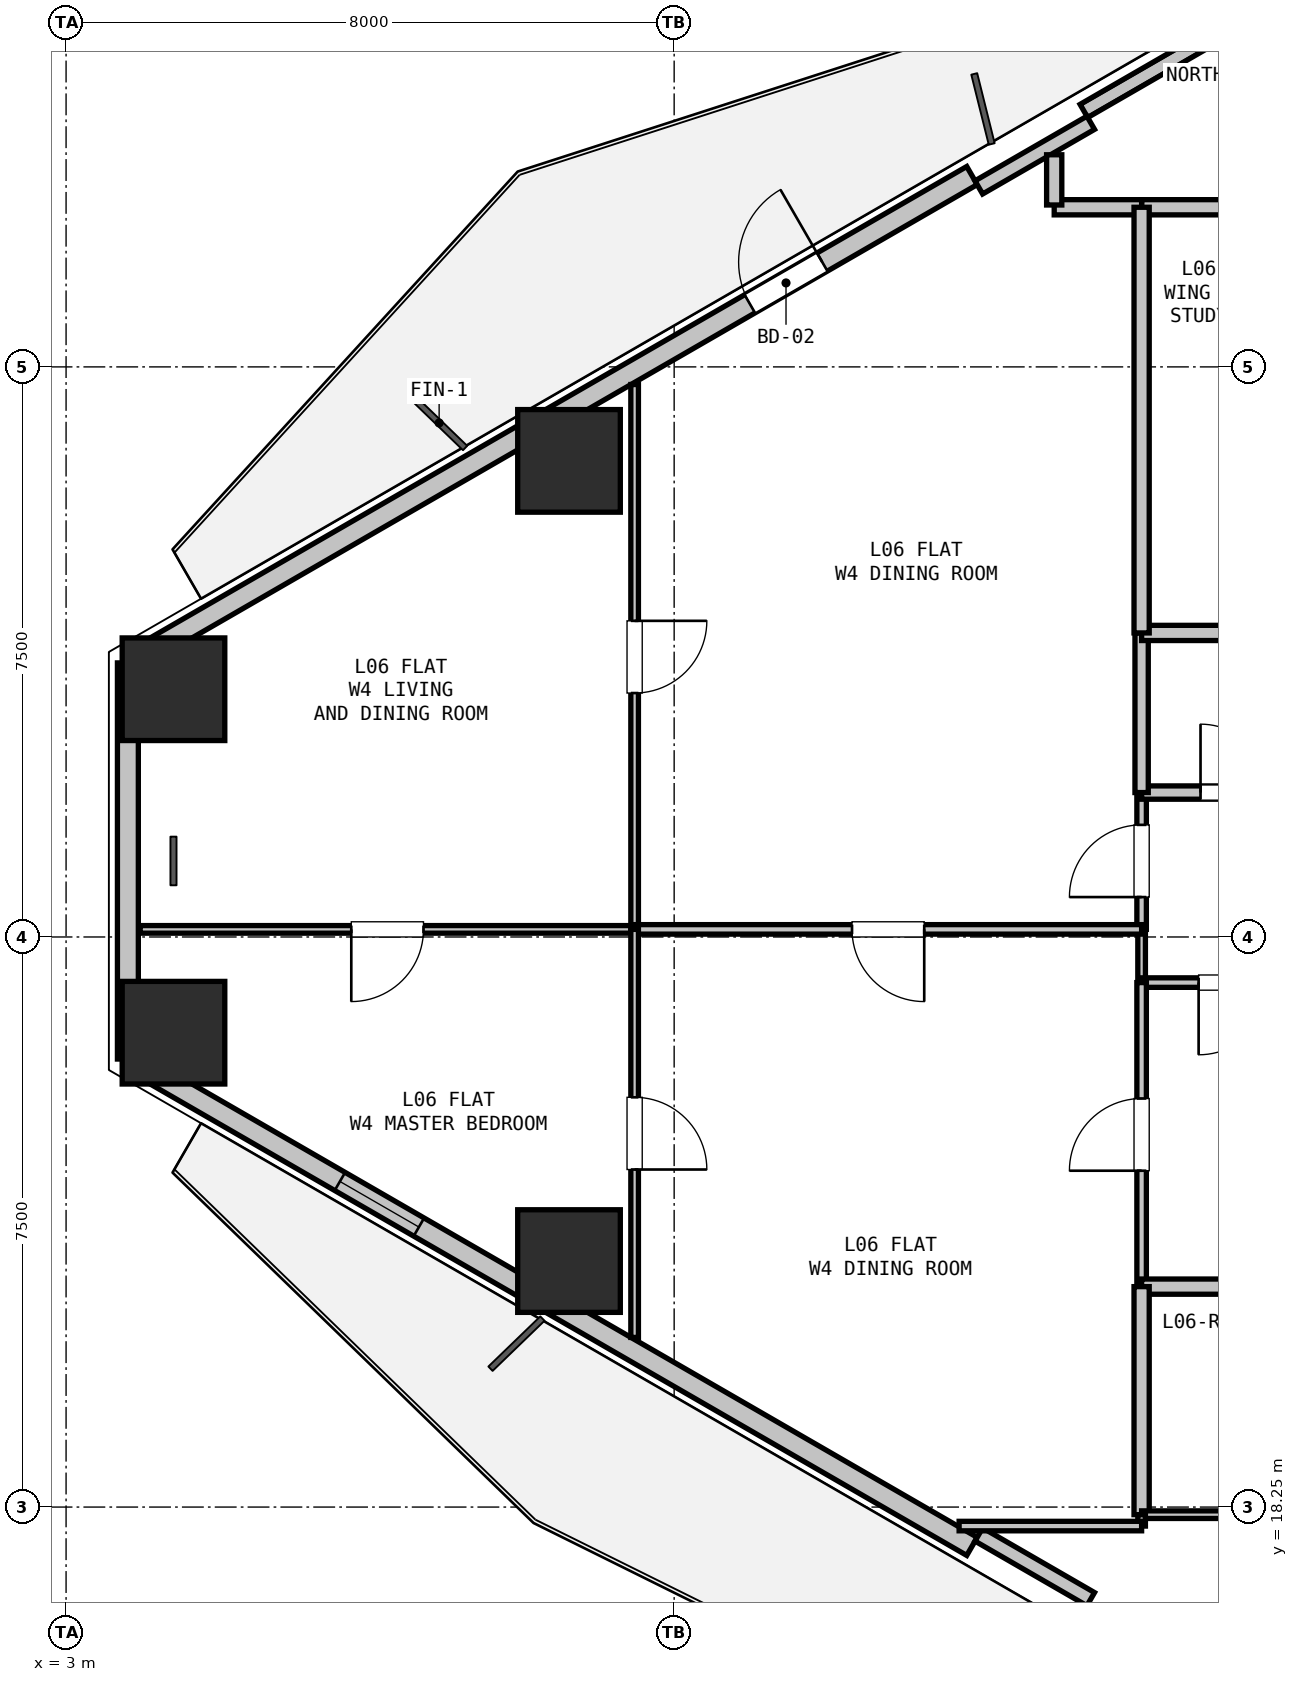
"""IFC4 building model, lengths in metres.
Left out: names, types, materials, properties, quantities, classifications, styles, units other than length and angle.
Written with IfcOpenShell. Run it as: python <this file> out.ifc"""

import sys

from ifc_helpers import new_model, si_unit, direction, frame, frame_2d, origin, origin_2d, place, context, subcontext, project, spatial, rectangle, hollow_rectangle, extrude, element, fill, save


model = new_model("IFC4")
c1 = context("Model", 3, precision=1e-05, world=origin(), true_north=direction((0.0, 1.0)))
c2 = subcontext(c1, "Body", "Model", "MODEL_VIEW")
j1 = project(units=[si_unit("LENGTHUNIT", "METRE"), si_unit("PLANEANGLEUNIT", "RADIAN")], contexts=[c1])
p1 = place(None, origin())
s1 = spatial("IfcSite", under=j1, at=p1, CompositionType="ELEMENT")
p2 = place(p1, origin())
s2 = spatial("IfcBuilding", under=s1, at=p2, CompositionType="ELEMENT")
p3 = place(p2, frame((0.0, 0.0, 25.8)))
s3 = spatial("IfcBuildingStorey", under=s2, at=p3, CompositionType="ELEMENT", Elevation=25.8)
for number, where, z_axis, x_axis in (
    (1, (4.413, 29.009, 0.0), (0.0, 0.0, 1.0), (1.0, 0.0, 0.0)),
    (2, (9.617, 32.014, 0.0), (0.0, 0.0, 1.0), (1.0, 0.0, 0.0)),
    (3, (9.617, 21.486, 0.0), (0.0, 0.0, 1.0), (1.0, 0.0, 0.0)),
    (4, (4.413, 24.491, 0.0), (0.0, 0.0, 1.0), (1.0, 0.0, 0.0)),
):
    element("IfcColumn", number, at=place(p3, frame(where, z_axis=z_axis, x_axis=x_axis)), inside=s3, PredefinedType="COLUMN", context=c2, shape_type="SweptSolid", body=[
        extrude(hollow_rectangle(XDim=1.35, YDim=1.35, WallThickness=0.036, at=origin_2d()), origin(), (0.0, 0.0, 1.0), 3.3),
    ])
p4 = place(p3, frame((3.813, 24.144, 0.0), z_axis=(0.0, 0.0, 1.0), x_axis=(0.0, 1.0, 0.0)))
e5 = element("IfcWall", 5, at=p4, inside=s3, PredefinedType="SOLIDWALL", context=c2, shape_type="SweptSolid", body=[
    extrude(rectangle(XDim=5.211, YDim=0.275, at=frame_2d((2.606, 0.0))), origin(), (0.0, 0.0, 1.0), 2.66),
])
p5 = place(p3, frame((3.943, 29.431, 0.0), z_axis=(0.0, 0.0, 1.0), x_axis=(0.866027105532, 0.499997052475, 0.0)))
e6 = element("IfcWall", 6, at=p5, inside=s3, PredefinedType="SOLIDWALL", context=c2, shape_type="SweptSolid", body=[
    extrude(rectangle(XDim=12.673, YDim=0.275, at=frame_2d((6.336, 0.0))), origin(), (0.0, 0.0, 1.0), 2.66),
])
p6 = place(p5, frame((9.298, 0.0, 0.0)))
e7 = element("IfcOpeningElement", 7, at=p6, cuts=e6, PredefinedType="OPENING", context=c2, shape_type="SweptSolid", body=[
    extrude(rectangle(XDim=1.1, YDim=2.1, at=frame_2d((0.55, 1.05))), frame((0.0, 0.147, 0.0), z_axis=(0.0, -1.0, 0.0), x_axis=(1.0, 0.0, 0.0)), (0.0, 0.0, 1.0), 0.295),
])
p7 = place(p3, frame((16.39, 36.617, 0.0), z_axis=(0.0, 0.0, 1.0), x_axis=(0.866027351828, 0.499996625875, 0.0)))
e8 = element("IfcWall", 8, at=p7, inside=s3, PredefinedType="PARAPET", context=c2, shape_type="SweptSolid", body=[
    extrude(rectangle(XDim=11.973, YDim=0.2, at=frame_2d((5.987, 0.0))), origin(), (0.0, 0.0, 1.0), 0.2),
])
p8 = place(p3, frame((15.008, 35.611, 0.0), z_axis=(0.0, 0.0, 1.0), x_axis=(0.86605165483, 0.499954529098, 0.0)))
e9 = element("IfcWall", 9, at=p8, inside=s3, PredefinedType="PARAPET", context=c2, shape_type="SweptSolid", body=[
    extrude(rectangle(XDim=1.7, YDim=0.2, at=frame_2d((0.85, 0.0))), origin(), (0.0, 0.0, 1.0), 2.66),
])
p9 = place(p3, frame((14.918, 17.733, 0.0), z_axis=(0.0, 0.0, 1.0), x_axis=(-0.866027105532, 0.499997052475, 0.0)))
e10 = element("IfcWall", 10, at=p9, inside=s3, PredefinedType="SOLIDWALL", context=c2, shape_type="SweptSolid", body=[
    extrude(rectangle(XDim=12.673, YDim=0.275, at=frame_2d((6.336, 0.0))), origin(), (0.0, 0.0, 1.0), 2.66),
])
p10 = place(p9, frame((8.402, 0.0, 0.9)))
e11 = element("IfcOpeningElement", 11, at=p10, cuts=e10, PredefinedType="OPENING", context=c2, shape_type="SweptSolid", body=[
    extrude(rectangle(XDim=1.2, YDim=1.4, at=frame_2d((0.6, 0.7))), frame((0.0, 0.147, 0.0), z_axis=(0.0, -1.0, 0.0), x_axis=(1.0, 0.0, 0.0)), (0.0, 0.0, 1.0), 0.295),
])
p11 = place(p3, frame((16.48, 17.039, 0.0), z_axis=(0.0, 0.0, 1.0), x_axis=(-0.86605165483, 0.499954529098, 0.0)))
e12 = element("IfcWall", 12, at=p11, inside=s3, PredefinedType="PARAPET", context=c2, shape_type="SweptSolid", body=[
    extrude(rectangle(XDim=1.7, YDim=0.2, at=frame_2d((0.85, 0.0))), origin(), (0.0, 0.0, 1.0), 2.66),
])
p12 = place(p3, frame((17.15, 25.15, 0.0), z_axis=(0.0, 0.0, 1.0), x_axis=(0.0, 1.0, 0.0)))
e13 = element("IfcWall", 13, at=p12, inside=s3, PredefinedType="PARTITIONING", context=c2, shape_type="SweptSolid", body=[
    extrude(rectangle(XDim=0.7, YDim=0.1, at=frame_2d((0.35, 0.0))), origin(), (0.0, 0.0, 1.0), 3.04),
])
p13 = place(p3, frame((17.15, 25.85, 0.0), z_axis=(0.0, 0.0, 1.0), x_axis=(0.0, 1.0, 0.0)))
e14 = element("IfcWall", 14, at=p13, inside=s3, PredefinedType="PARTITIONING", context=c2, shape_type="SweptSolid", body=[
    extrude(rectangle(XDim=1.8, YDim=0.125, at=frame_2d((0.9, 0.0))), origin(), (0.0, 0.0, 1.0), 3.04),
])
p14 = place(p13, frame((0.425, 0.0, 0.0)))
e15 = element("IfcOpeningElement", 15, at=p14, cuts=e14, PredefinedType="OPENING", context=c2, shape_type="SweptSolid", body=[
    extrude(rectangle(XDim=0.95, YDim=2.1, at=frame_2d((0.475, 1.05))), frame((0.0, 0.073, 0.0), z_axis=(0.0, -1.0, 0.0), x_axis=(1.0, 0.0, 0.0)), (0.0, 0.0, 1.0), 0.145),
])
p15 = place(p3, frame((17.15, 27.65, 0.0), z_axis=(0.0, 0.0, 1.0), x_axis=(1.0, 0.0, 0.0)))
e16 = element("IfcWall", 16, at=p15, inside=s3, PredefinedType="PLUMBINGWALL", context=c2, shape_type="SweptSolid", body=[
    extrude(rectangle(XDim=2.45, YDim=0.175, at=frame_2d((1.225, 0.0))), origin(), (0.0, 0.0, 1.0), 3.04),
])
p16 = place(p15, frame((0.775, 0.0, 0.0)))
e17 = element("IfcOpeningElement", 17, at=p16, cuts=e16, PredefinedType="OPENING", context=c2, shape_type="SweptSolid", body=[
    extrude(rectangle(XDim=0.9, YDim=2.1, at=frame_2d((0.45, 1.05))), frame((0.0, 0.097, 0.0), z_axis=(0.0, -1.0, 0.0), x_axis=(1.0, 0.0, 0.0)), (0.0, 0.0, 1.0), 0.195),
])
p17 = place(p3, frame((19.6, 25.15, 0.0), z_axis=(0.0, 0.0, 1.0), x_axis=(-1.0, 0.0, 0.0)))
e18 = element("IfcWall", 18, at=p17, inside=s3, PredefinedType="PARTITIONING", context=c2, shape_type="SweptSolid", body=[
    extrude(rectangle(XDim=2.45, YDim=0.125, at=frame_2d((1.225, 0.0))), origin(), (0.0, 0.0, 1.0), 3.04),
])
p18 = place(p17, frame((0.75, 0.0, 0.0)))
e19 = element("IfcOpeningElement", 19, at=p18, cuts=e18, PredefinedType="OPENING", context=c2, shape_type="SweptSolid", body=[
    extrude(rectangle(XDim=0.95, YDim=2.1, at=frame_2d((0.475, 1.05))), frame((0.0, 0.073, 0.0), z_axis=(0.0, -1.0, 0.0), x_axis=(1.0, 0.0, 0.0)), (0.0, 0.0, 1.0), 0.145),
])
p19 = place(p3, frame((17.15, 27.65, 0.0), z_axis=(0.0, 0.0, 1.0), x_axis=(0.0, 1.0, 0.0)))
e20 = element("IfcWall", 20, at=p19, inside=s3, PredefinedType="PLUMBINGWALL", context=c2, shape_type="SweptSolid", body=[
    extrude(rectangle(XDim=2.1, YDim=0.175, at=frame_2d((1.05, 0.0))), origin(), (0.0, 0.0, 1.0), 3.04),
])
p20 = place(p3, frame((17.15, 29.75, 0.0), z_axis=(0.0, 0.0, 1.0), x_axis=(1.0, 0.0, 0.0)))
e21 = element("IfcWall", 21, at=p20, inside=s3, PredefinedType="PARTITIONING", context=c2, shape_type="SweptSolid", body=[
    extrude(rectangle(XDim=2.45, YDim=0.2, at=frame_2d((1.225, 0.0))), origin(), (0.0, 0.0, 1.0), 3.04),
])
p21 = place(p3, frame((17.15, 21.15, 0.0), z_axis=(0.0, 0.0, 1.0), x_axis=(0.0, 1.0, 0.0)))
e22 = element("IfcWall", 22, at=p21, inside=s3, PredefinedType="PARTITIONING", context=c2, shape_type="SweptSolid", body=[
    extrude(rectangle(XDim=4.0, YDim=0.125, at=frame_2d((2.0, 0.0))), origin(), (0.0, 0.0, 1.0), 2.337),
])
p22 = place(p21, frame((1.525, 0.0, 0.0)))
e23 = element("IfcOpeningElement", 23, at=p22, cuts=e22, PredefinedType="OPENING", context=c2, shape_type="SweptSolid", body=[
    extrude(rectangle(XDim=0.95, YDim=2.1, at=frame_2d((0.475, 1.05))), frame((0.0, 0.073, 0.0), z_axis=(0.0, -1.0, 0.0), x_axis=(1.0, 0.0, 0.0)), (0.0, 0.0, 1.0), 0.145),
])
p23 = place(p3, frame((19.6, 21.15, 0.0), z_axis=(0.0, 0.0, 1.0), x_axis=(-1.0, 0.0, 0.0)))
e24 = element("IfcWall", 24, at=p23, inside=s3, PredefinedType="PARTITIONING", context=c2, shape_type="SweptSolid", body=[
    extrude(rectangle(XDim=2.45, YDim=0.2, at=frame_2d((1.225, 0.0))), origin(), (0.0, 0.0, 1.0), 2.337),
])
p24 = place(p3, frame((19.6, 35.35, 0.0), z_axis=(0.0, 0.0, 1.0), x_axis=(-1.0, 0.0, 0.0)))
e25 = element("IfcWall", 25, at=p24, inside=s3, PredefinedType="PARTITIONING", context=c2, shape_type="SweptSolid", body=[
    extrude(rectangle(XDim=2.45, YDim=0.2, at=frame_2d((1.225, 0.0))), origin(), (0.0, 0.0, 1.0), 3.04),
])
p25 = place(p3, frame((17.15, 35.35, 0.0), z_axis=(0.0, 0.0, 1.0), x_axis=(-1.0, 0.0, 0.0)))
e26 = element("IfcWall", 26, at=p25, inside=s3, PredefinedType="PARTITIONING", context=c2, shape_type="SweptSolid", body=[
    extrude(rectangle(XDim=1.15, YDim=0.2, at=frame_2d((0.575, 0.0))), origin(), (0.0, 0.0, 1.0), 3.04),
])
p26 = place(p3, frame((16.0, 35.38, 0.0), z_axis=(0.0, 0.0, 1.0), x_axis=(0.0, 1.0, 0.0)))
e27 = element("IfcWall", 27, at=p26, inside=s3, PredefinedType="PARTITIONING", context=c2, shape_type="SweptSolid", body=[
    extrude(rectangle(XDim=0.661, YDim=0.2, at=frame_2d((0.331, 0.0))), origin(), (0.0, 0.0, 1.0), 2.365),
])
p27 = place(p3, frame((17.15, 29.75, 0.0), z_axis=(0.0, 0.0, 1.0), x_axis=(0.0, 1.0, 0.0)))
e28 = element("IfcWall", 28, at=p27, inside=s3, PredefinedType="PARTITIONING", context=c2, shape_type="SweptSolid", body=[
    extrude(rectangle(XDim=5.6, YDim=0.2, at=frame_2d((2.8, 0.0))), origin(), (0.0, 0.0, 1.0), 2.337),
])
p28 = place(p3, frame((17.15, 18.15, 0.0), z_axis=(0.0, 0.0, 1.0), x_axis=(0.0, 1.0, 0.0)))
e29 = element("IfcWall", 29, at=p28, inside=s3, PredefinedType="PARTITIONING", context=c2, shape_type="SweptSolid", body=[
    extrude(rectangle(XDim=3.0, YDim=0.2, at=frame_2d((1.5, 0.0))), origin(), (0.0, 0.0, 1.0), 3.04),
])
p29 = place(p3, frame((19.6, 18.15, 0.0), z_axis=(0.0, 0.0, 1.0), x_axis=(-1.0, 0.0, 0.0)))
e30 = element("IfcWall", 30, at=p29, inside=s3, PredefinedType="PARTITIONING", context=c2, shape_type="SweptSolid", body=[
    extrude(rectangle(XDim=2.45, YDim=0.1, at=frame_2d((1.225, 0.0))), origin(), (0.0, 0.0, 1.0), 3.04),
])
p30 = place(p3, frame((10.48, 25.85, 0.0), z_axis=(0.0, 0.0, 1.0), x_axis=(-1.0, 0.0, 0.0)))
e31 = element("IfcWall", 31, at=p30, inside=s3, PredefinedType="PARTITIONING", context=c2, shape_type="SweptSolid", body=[
    extrude(rectangle(XDim=6.505, YDim=0.1, at=frame_2d((3.253, 0.0))), origin(), (0.0, 0.0, 1.0), 2.65),
])
p31 = place(p30, frame((2.778, 0.0, 0.0)))
e32 = element("IfcOpeningElement", 32, at=p31, cuts=e31, PredefinedType="OPENING", context=c2, shape_type="SweptSolid", body=[
    extrude(rectangle(XDim=0.95, YDim=2.1, at=frame_2d((0.475, 1.05))), frame((0.0, 0.06, 0.0), z_axis=(0.0, -1.0, 0.0), x_axis=(1.0, 0.0, 0.0)), (0.0, 0.0, 1.0), 0.12),
])
p32 = place(p3, frame((3.813, 29.356, 0.0), z_axis=(0.0, 0.0, 1.0), x_axis=(0.866131372301, 0.499816412211, 0.0)))
e33 = element("IfcWall", 33, at=p32, inside=s3, PredefinedType="PARTITIONING", context=c2, shape_type="SweptSolid", body=[
    extrude(rectangle(XDim=0.15, YDim=0.125, at=frame_2d((0.075, 0.0))), origin(), (0.0, 0.0, 1.0), 3.04),
])
p33 = place(p3, frame((10.48, 33.018, 0.0), z_axis=(0.0, 0.0, 1.0), x_axis=(0.0, -1.0, 0.0)))
e34 = element("IfcWall", 34, at=p33, inside=s3, PredefinedType="PARTITIONING", context=c2, shape_type="SweptSolid", body=[
    extrude(rectangle(XDim=7.168, YDim=0.1, at=frame_2d((3.584, 0.0))), origin(), (0.0, 0.0, 1.0), 2.337),
])
p34 = place(p33, frame((3.109, 0.0, 0.0)))
e35 = element("IfcOpeningElement", 35, at=p34, cuts=e34, PredefinedType="OPENING", context=c2, shape_type="SweptSolid", body=[
    extrude(rectangle(XDim=0.95, YDim=2.1, at=frame_2d((0.475, 1.05))), frame((0.0, 0.06, 0.0), z_axis=(0.0, -1.0, 0.0), x_axis=(1.0, 0.0, 0.0)), (0.0, 0.0, 1.0), 0.12),
])
p35 = place(p3, frame((17.15, 25.85, 0.0), z_axis=(0.0, 0.0, 1.0), x_axis=(-1.0, 0.0, 0.0)))
e36 = element("IfcWall", 36, at=p35, inside=s3, PredefinedType="PARTITIONING", context=c2, shape_type="SweptSolid", body=[
    extrude(rectangle(XDim=6.67, YDim=0.125, at=frame_2d((3.335, 0.0))), origin(), (0.0, 0.0, 1.0), 3.04),
])
p36 = place(p35, frame((2.86, 0.0, 0.0)))
e37 = element("IfcOpeningElement", 37, at=p36, cuts=e36, PredefinedType="OPENING", context=c2, shape_type="SweptSolid", body=[
    extrude(rectangle(XDim=0.95, YDim=2.1, at=frame_2d((0.475, 1.05))), frame((0.0, 0.073, 0.0), z_axis=(0.0, -1.0, 0.0), x_axis=(1.0, 0.0, 0.0)), (0.0, 0.0, 1.0), 0.145),
])
p37 = place(p3, frame((10.48, 25.85, 0.0), z_axis=(0.0, 0.0, 1.0), x_axis=(0.0, -1.0, 0.0)))
e38 = element("IfcWall", 38, at=p37, inside=s3, PredefinedType="PARTITIONING", context=c2, shape_type="SweptSolid", body=[
    extrude(rectangle(XDim=5.368, YDim=0.1, at=frame_2d((2.684, 0.0))), origin(), (0.0, 0.0, 1.0), 2.337),
])
p38 = place(p37, frame((2.209, 0.0, 0.0)))
e39 = element("IfcOpeningElement", 39, at=p38, cuts=e38, PredefinedType="OPENING", context=c2, shape_type="SweptSolid", body=[
    extrude(rectangle(XDim=0.95, YDim=2.1, at=frame_2d((0.475, 1.05))), frame((0.0, 0.06, 0.0), z_axis=(0.0, -1.0, 0.0), x_axis=(1.0, 0.0, 0.0)), (0.0, 0.0, 1.0), 0.12),
])
p39 = place(p3, frame((3.943, 24.069, 0.0), z_axis=(0.0, 0.0, 1.0), x_axis=(-0.866131372301, 0.499816412211, 0.0)))
e40 = element("IfcWall", 40, at=p39, inside=s3, PredefinedType="PARTITIONING", context=c2, shape_type="SweptSolid", body=[
    extrude(rectangle(XDim=0.15, YDim=0.125, at=frame_2d((0.075, 0.0))), origin(), (0.0, 0.0, 1.0), 3.04),
])
p40 = place(p3, frame((17.15, 18.15, 0.0), z_axis=(0.0, 0.0, 1.0), x_axis=(0.0, -1.0, 0.0)))
e41 = element("IfcWall", 41, at=p40, inside=s3, PredefinedType="PARTITIONING", context=c2, shape_type="SweptSolid", body=[
    extrude(rectangle(XDim=0.15, YDim=0.1, at=frame_2d((0.075, 0.0))), origin(), (0.0, 0.0, 1.0), 3.04),
])
p41 = place(p3, frame((17.15, 18.0, 0.0), z_axis=(0.0, 0.0, 1.0), x_axis=(-1.0, 0.0, 0.0)))
e42 = element("IfcWall", 42, at=p41, inside=s3, PredefinedType="PARTITIONING", context=c2, shape_type="SweptSolid", body=[
    extrude(rectangle(XDim=2.401, YDim=0.125, at=frame_2d((1.2, 0.0))), origin(), (0.0, 0.0, 1.0), 2.365),
])
p42 = place(p6, origin())
e43 = element("IfcDoor", 43, at=p42, inside=s3, OperationType="SINGLE_SWING_RIGHT", PredefinedType="DOOR", context=c2, shape_type="SweptSolid", body=[
    extrude(rectangle(XDim=1.1, YDim=2.1, at=frame_2d((0.55, 1.05))), frame((0.0, 0.025, 0.0), z_axis=(0.0, -1.0, 0.0), x_axis=(1.0, 0.0, 0.0)), (0.0, 0.0, 1.0), 0.05),
])
fill(e7, e43)
p43 = place(p10, origin())
e44 = element("IfcWindow", 44, at=p43, inside=s3, PartitioningType="SINGLE_PANEL", PredefinedType="WINDOW", context=c2, shape_type="SweptSolid", body=[
    extrude(rectangle(XDim=1.2, YDim=1.4, at=frame_2d((0.6, 0.7))), frame((0.0, 0.03, 0.0), z_axis=(0.0, -1.0, 0.0), x_axis=(1.0, 0.0, 0.0)), (0.0, 0.0, 1.0), 0.06),
])
fill(e11, e44)
p44 = place(p16, origin())
e45 = element("IfcDoor", 45, at=p44, inside=s3, OperationType="SINGLE_SWING_LEFT", PredefinedType="DOOR", context=c2, shape_type="SweptSolid", body=[
    extrude(rectangle(XDim=0.9, YDim=2.1, at=frame_2d((0.45, 1.05))), frame((0.0, 0.025, 0.0), z_axis=(0.0, -1.0, 0.0), x_axis=(1.0, 0.0, 0.0)), (0.0, 0.0, 1.0), 0.05),
])
fill(e17, e45)
p45 = place(p18, origin())
e46 = element("IfcDoor", 46, at=p45, inside=s3, OperationType="SINGLE_SWING_RIGHT", PredefinedType="DOOR", context=c2, shape_type="SweptSolid", body=[
    extrude(rectangle(XDim=0.95, YDim=2.1, at=frame_2d((0.475, 1.05))), frame((0.0, 0.025, 0.0), z_axis=(0.0, -1.0, 0.0), x_axis=(1.0, 0.0, 0.0)), (0.0, 0.0, 1.0), 0.05),
])
fill(e19, e46)
p46 = place(p14, origin())
e47 = element("IfcDoor", 47, at=p46, inside=s3, OperationType="SINGLE_SWING_LEFT", PredefinedType="DOOR", context=c2, shape_type="SweptSolid", body=[
    extrude(rectangle(XDim=0.95, YDim=2.1, at=frame_2d((0.475, 1.05))), frame((0.0, 0.025, 0.0), z_axis=(0.0, -1.0, 0.0), x_axis=(1.0, 0.0, 0.0)), (0.0, 0.0, 1.0), 0.05),
])
fill(e15, e47)
p47 = place(p22, origin())
e48 = element("IfcDoor", 48, at=p47, inside=s3, OperationType="SINGLE_SWING_LEFT", PredefinedType="DOOR", context=c2, shape_type="SweptSolid", body=[
    extrude(rectangle(XDim=0.95, YDim=2.1, at=frame_2d((0.475, 1.05))), frame((0.0, 0.025, 0.0), z_axis=(0.0, -1.0, 0.0), x_axis=(1.0, 0.0, 0.0)), (0.0, 0.0, 1.0), 0.05),
])
fill(e23, e48)
p48 = place(p34, origin())
e49 = element("IfcDoor", 49, at=p48, inside=s3, OperationType="SINGLE_SWING_LEFT", PredefinedType="DOOR", context=c2, shape_type="SweptSolid", body=[
    extrude(rectangle(XDim=0.95, YDim=2.1, at=frame_2d((0.475, 1.05))), frame((0.0, 0.025, 0.0), z_axis=(0.0, -1.0, 0.0), x_axis=(1.0, 0.0, 0.0)), (0.0, 0.0, 1.0), 0.05),
])
fill(e35, e49)
p49 = place(p31, origin())
e50 = element("IfcDoor", 50, at=p49, inside=s3, OperationType="SINGLE_SWING_RIGHT", PredefinedType="DOOR", context=c2, shape_type="SweptSolid", body=[
    extrude(rectangle(XDim=0.95, YDim=2.1, at=frame_2d((0.475, 1.05))), frame((0.0, 0.025, 0.0), z_axis=(0.0, -1.0, 0.0), x_axis=(1.0, 0.0, 0.0)), (0.0, 0.0, 1.0), 0.05),
])
fill(e32, e50)
p50 = place(p36, origin())
e51 = element("IfcDoor", 51, at=p50, inside=s3, OperationType="SINGLE_SWING_LEFT", PredefinedType="DOOR", context=c2, shape_type="SweptSolid", body=[
    extrude(rectangle(XDim=0.95, YDim=2.1, at=frame_2d((0.475, 1.05))), frame((0.0, 0.025, 0.0), z_axis=(0.0, -1.0, 0.0), x_axis=(1.0, 0.0, 0.0)), (0.0, 0.0, 1.0), 0.05),
])
fill(e37, e51)
p51 = place(p38, origin())
e52 = element("IfcDoor", 52, at=p51, inside=s3, OperationType="SINGLE_SWING_RIGHT", PredefinedType="DOOR", context=c2, shape_type="SweptSolid", body=[
    extrude(rectangle(XDim=0.95, YDim=2.1, at=frame_2d((0.475, 1.05))), frame((0.0, 0.025, 0.0), z_axis=(0.0, -1.0, 0.0), x_axis=(1.0, 0.0, 0.0)), (0.0, 0.0, 1.0), 0.05),
])
fill(e39, e52)
save(model, sys.argv[1])
